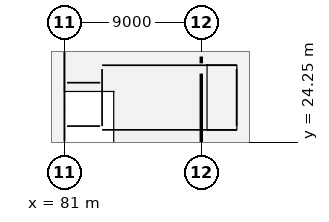
"""IFC4 building model, lengths in metres.
Left out: names, types, materials, properties, quantities, classifications, styles, units other than length and angle.
Written with IfcOpenShell. Run it as: python <this file> out.ifc"""

import sys

from ifc_helpers import new_model, si_unit, direction, frame, frame_2d, origin, origin_2d, place, context, subcontext, project, spatial, rectangle, extrude, element, fill, save


model = new_model("IFC4")
c1 = context("Model", 3, precision=1e-05, world=origin(), true_north=direction((0.0, 1.0)))
c2 = subcontext(c1, "Body", "Model", "MODEL_VIEW")
j1 = project(units=[si_unit("LENGTHUNIT", "METRE"), si_unit("PLANEANGLEUNIT", "RADIAN")], contexts=[c1])
p1 = place(None, origin())
s1 = spatial("IfcSite", under=j1, at=p1, CompositionType="ELEMENT")
p2 = place(p1, origin())
s2 = spatial("IfcBuilding", under=s1, at=p2, CompositionType="ELEMENT")
p3 = place(p2, origin())
s3 = spatial("IfcBuildingStorey", under=s2, at=p3, CompositionType="ELEMENT", Elevation=0.0)
for number, where, z_axis, x_axis in (
    (1, (81.0, 24.0, -0.5), (0.0, 0.0, 1.0), (1.0, 0.0, 0.0)),
    (2, (90.0, 24.0, -0.5), (0.0, 0.0, 1.0), (1.0, 0.0, 0.0)),
):
    element("IfcColumn", number, at=place(p3, frame(where, z_axis=z_axis, x_axis=x_axis)), inside=s3, PredefinedType="COLUMN", context=c2, shape_type="SweptSolid", body=[
        extrude(rectangle(XDim=0.65, YDim=0.65, at=origin_2d()), origin(), (0.0, 0.0, 1.0), 6.8),
    ])
p4 = place(p3, frame((81.0, 24.325, 0.0), z_axis=(0.0, 0.0, 1.0), x_axis=(0.0, 1.0, 0.0)))
e3 = element("IfcWall", 3, at=p4, inside=s3, PredefinedType="SOLIDWALL", context=c2, shape_type="SweptSolid", body=[
    extrude(rectangle(XDim=7.35, YDim=0.34, at=frame_2d((3.675, 0.0))), origin(), (0.0, 0.0, 1.0), 5.35),
])
p5 = place(p4, frame((4.0, 0.0, 0.85)))
e4 = element("IfcOpeningElement", 4, at=p5, cuts=e3, PredefinedType="OPENING", context=c2, shape_type="SweptSolid", body=[
    extrude(rectangle(XDim=1.8, YDim=3.15, at=frame_2d((0.9, 1.575))), frame((0.0, 0.18, 0.0), z_axis=(0.0, -1.0, 0.0), x_axis=(1.0, 0.0, 0.0)), (0.0, 0.0, 1.0), 0.36),
])
p6 = place(p4, frame((2.1, 0.0, 0.0)))
e5 = element("IfcOpeningElement", 5, at=p6, cuts=e3, PredefinedType="OPENING", context=c2, shape_type="SweptSolid", body=[
    extrude(rectangle(XDim=1.2, YDim=2.25, at=frame_2d((0.6, 1.125))), frame((0.0, 0.18, 0.0), z_axis=(0.0, -1.0, 0.0), x_axis=(1.0, 0.0, 0.0)), (0.0, 0.0, 1.0), 0.36),
])
for number, where, z_axis, x_axis in (
    (6, (83.475, 25.075, -0.5), (0.0, 0.0, 1.0), (1.0, 0.0, 0.0)),
    (7, (83.475, 29.325, -0.5), (0.0, 0.0, 1.0), (1.0, 0.0, 0.0)),
):
    element("IfcWall", number, at=place(p3, frame(where, z_axis=z_axis, x_axis=x_axis)), inside=s3, PredefinedType="SOLIDWALL", context=c2, shape_type="SweptSolid", body=[
        extrude(rectangle(XDim=8.85, YDim=0.25, at=frame_2d((4.425, 0.0))), origin(), (0.0, 0.0, 1.0), 6.8),
    ])
p7 = place(p3, frame((83.475, 25.325, -0.5), z_axis=(0.0, 0.0, 1.0), x_axis=(0.0, 1.0, 0.0)))
e8 = element("IfcWall", 8, at=p7, inside=s3, PredefinedType="SOLIDWALL", context=c2, shape_type="SweptSolid", body=[
    extrude(rectangle(XDim=3.75, YDim=0.25, at=frame_2d((1.875, 0.0))), origin(), (0.0, 0.0, 1.0), 6.8),
])
p8 = place(p7, frame((1.1, 0.0, 0.5)))
e9 = element("IfcOpeningElement", 9, at=p8, cuts=e8, PredefinedType="OPENING", context=c2, shape_type="SweptSolid", body=[
    extrude(rectangle(XDim=1.2, YDim=2.2, at=frame_2d((0.6, 1.1))), frame((0.0, 0.135, 0.0), z_axis=(0.0, -1.0, 0.0), x_axis=(1.0, 0.0, 0.0)), (0.0, 0.0, 1.0), 0.27),
])
p9 = place(p3, frame((92.325, 25.325, -0.5), z_axis=(0.0, 0.0, 1.0), x_axis=(0.0, 1.0, 0.0)))
e10 = element("IfcWall", 10, at=p9, inside=s3, PredefinedType="SOLIDWALL", context=c2, shape_type="SweptSolid", body=[
    extrude(rectangle(XDim=3.75, YDim=0.25, at=frame_2d((1.875, 0.0))), origin(), (0.0, 0.0, 1.0), 6.8),
])
for number, where, z_axis, x_axis in (
    (11, (81.17, 25.323, 0.0), (0.0, 0.0, 1.0), (1.0, 0.0, 0.0)),
    (12, (81.17, 28.177, 0.0), (0.0, 0.0, 1.0), (1.0, 0.0, 0.0)),
):
    element("IfcWall", number, at=place(p3, frame(where, z_axis=z_axis, x_axis=x_axis)), inside=s3, PredefinedType="STANDARD", context=c2, shape_type="SweptSolid", body=[
        extrude(rectangle(XDim=2.18, YDim=0.255, at=frame_2d((1.09, 0.0))), origin(), (0.0, 0.0, 1.0), 5.95),
    ])
p10 = place(p5, origin())
e13 = element("IfcWindow", 13, at=p10, inside=s3, PartitioningType="DOUBLE_PANEL_VERTICAL", PredefinedType="WINDOW", context=c2, shape_type="SweptSolid", body=[
    extrude(rectangle(XDim=1.8, YDim=3.15, at=frame_2d((0.9, 1.575))), frame((0.0, 0.03, 0.0), z_axis=(0.0, -1.0, 0.0), x_axis=(1.0, 0.0, 0.0)), (0.0, 0.0, 1.0), 0.06),
])
fill(e4, e13)
p11 = place(p8, origin())
e14 = element("IfcDoor", 14, at=p11, inside=s3, OperationType="SINGLE_SWING_RIGHT", PredefinedType="DOOR", context=c2, shape_type="SweptSolid", body=[
    extrude(rectangle(XDim=1.2, YDim=2.2, at=frame_2d((0.6, 1.1))), frame((0.0, 0.025, 0.0), z_axis=(0.0, -1.0, 0.0), x_axis=(1.0, 0.0, 0.0)), (0.0, 0.0, 1.0), 0.05),
])
fill(e9, e14)
p12 = place(p6, origin())
e15 = element("IfcDoor", 15, at=p12, inside=s3, OperationType="SINGLE_SWING_LEFT", PredefinedType="DOOR", context=c2, shape_type="SweptSolid", body=[
    extrude(rectangle(XDim=1.2, YDim=2.25, at=frame_2d((0.6, 1.125))), frame((0.0, 0.025, 0.0), z_axis=(0.0, -1.0, 0.0), x_axis=(1.0, 0.0, 0.0)), (0.0, 0.0, 1.0), 0.05),
])
fill(e5, e15)
save(model, sys.argv[1])
